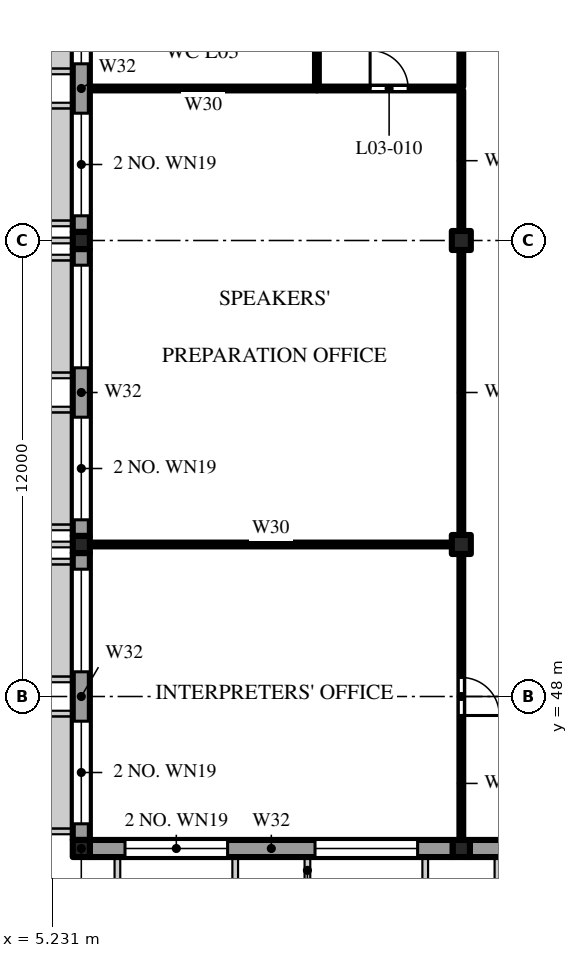
"""IFC4 building model, lengths in metres.
Left out: names, types, materials, properties, quantities, classifications, styles, units other than length and angle.
Written with IfcOpenShell. Run it as: python <this file> out.ifc"""

import sys

from ifc_helpers import new_model, si_unit, direction, frame, frame_2d, origin, origin_2d, place, context, subcontext, project, spatial, polyline, rectangle, outline, extrude, element, fill, save


model = new_model("IFC4")
c1 = context("Model", 3, precision=1e-05, world=origin(), true_north=direction((0.0, 1.0)))
c2 = subcontext(c1, "Body", "Model", "MODEL_VIEW")
j1 = project(units=[si_unit("LENGTHUNIT", "METRE"), si_unit("PLANEANGLEUNIT", "RADIAN")], contexts=[c1])
p1 = place(None, origin())
s1 = spatial("IfcSite", under=j1, at=p1, CompositionType="ELEMENT")
p2 = place(p1, origin())
s2 = spatial("IfcBuilding", under=s1, at=p2, CompositionType="ELEMENT")
p3 = place(p2, frame((0.0, 0.0, 16.8)))
s3 = spatial("IfcBuildingStorey", under=s2, at=p3, CompositionType="ELEMENT", Elevation=16.8)
p4 = place(p3, frame((6.0, 44.0, 0.0), z_axis=(0.0, 0.0, 1.0), x_axis=(1.0, 0.0, 0.0)))
e1 = element("IfcColumn", 1, at=p4, inside=s3, PredefinedType="COLUMN", context=c2, shape_type="SweptSolid", body=[
    extrude(rectangle(XDim=0.45, YDim=0.45, at=origin_2d()), origin(), (0.0, 0.0, 1.0), 3.691),
])
for number, where, z_axis, x_axis in (
    (2, (6.0, 52.0, 0.0), (0.0, 0.0, 1.0), (1.0, 0.0, 0.0)),
    (3, (6.0, 60.0, 0.0), (0.0, 0.0, 1.0), (1.0, 0.0, 0.0)),
):
    element("IfcColumn", number, at=place(p3, frame(where, z_axis=z_axis, x_axis=x_axis)), inside=s3, PredefinedType="COLUMN", context=c2, shape_type="SweptSolid", body=[
        extrude(rectangle(XDim=0.45, YDim=0.45, at=origin_2d()), origin(), (0.0, 0.0, 1.0), 4.8),
    ])
p5 = place(p3, frame((16.0, 44.0, 0.0), z_axis=(0.0, 0.0, 1.0), x_axis=(1.0, 0.0, 0.0)))
e4 = element("IfcColumn", 4, at=p5, inside=s3, PredefinedType="COLUMN", context=c2, shape_type="SweptSolid", body=[
    extrude(rectangle(XDim=0.45, YDim=0.45, at=origin_2d()), origin(), (0.0, 0.0, 1.0), 3.691),
])
for number, where, z_axis, x_axis in (
    (5, (16.0, 52.0, 0.0), (0.0, 0.0, 1.0), (1.0, 0.0, 0.0)),
    (6, (16.0, 60.0, 0.0), (0.0, 0.0, 1.0), (1.0, 0.0, 0.0)),
):
    element("IfcColumn", number, at=place(p3, frame(where, z_axis=z_axis, x_axis=x_axis)), inside=s3, PredefinedType="COLUMN", context=c2, shape_type="SweptSolid", body=[
        extrude(rectangle(XDim=0.5, YDim=0.5, at=origin_2d()), origin(), (0.0, 0.0, 1.0), 4.8),
    ])
p6 = place(p3, frame((6.225, 44.0, 0.0), z_axis=(0.0, 0.0, 1.0), x_axis=(1.0, 0.0, 0.0)))
e7 = element("IfcWall", 7, at=p6, inside=s3, PredefinedType="SOLIDWALL", context=c2, shape_type="SweptSolid", body=[
    extrude(rectangle(XDim=9.55, YDim=0.45, at=frame_2d((4.775, 0.0))), origin(), (0.0, 0.0, 1.0), 3.541),
])
p7 = place(p6, frame((0.925, 0.0, 0.8)))
e8 = element("IfcOpeningElement", 8, at=p7, cuts=e7, PredefinedType="OPENING", context=c2, shape_type="SweptSolid", body=[
    extrude(rectangle(XDim=2.7, YDim=2.4, at=frame_2d((1.35, 1.2))), frame((0.0, 0.235, 0.0), z_axis=(0.0, -1.0, 0.0), x_axis=(1.0, 0.0, 0.0)), (0.0, 0.0, 1.0), 0.47),
])
p8 = place(p6, frame((5.925, 0.0, 0.8)))
e9 = element("IfcOpeningElement", 9, at=p8, cuts=e7, PredefinedType="OPENING", context=c2, shape_type="SweptSolid", body=[
    extrude(rectangle(XDim=2.7, YDim=2.4, at=frame_2d((1.35, 1.2))), frame((0.0, 0.235, 0.0), z_axis=(0.0, -1.0, 0.0), x_axis=(1.0, 0.0, 0.0)), (0.0, 0.0, 1.0), 0.47),
])
p9 = place(p3, frame((16.225, 44.0, 0.0), z_axis=(0.0, 0.0, 1.0), x_axis=(1.0, 0.0, 0.0)))
e10 = element("IfcWall", 10, at=p9, inside=s3, PredefinedType="SOLIDWALL", context=c2, shape_type="SweptSolid", body=[
    extrude(rectangle(XDim=9.55, YDim=0.45, at=frame_2d((4.775, 0.0))), origin(), (0.0, 0.0, 1.0), 3.541),
])
p10 = place(p9, frame((0.925, 0.0, 0.8)))
e11 = element("IfcOpeningElement", 11, at=p10, cuts=e10, PredefinedType="OPENING", context=c2, shape_type="SweptSolid", body=[
    extrude(rectangle(XDim=2.7, YDim=2.4, at=frame_2d((1.35, 1.2))), frame((0.0, 0.235, 0.0), z_axis=(0.0, -1.0, 0.0), x_axis=(1.0, 0.0, 0.0)), (0.0, 0.0, 1.0), 0.47),
])
p11 = place(p9, frame((5.925, 0.0, 0.8)))
e12 = element("IfcOpeningElement", 12, at=p11, cuts=e10, PredefinedType="OPENING", context=c2, shape_type="SweptSolid", body=[
    extrude(rectangle(XDim=2.7, YDim=2.4, at=frame_2d((1.35, 1.2))), frame((0.0, 0.235, 0.0), z_axis=(0.0, -1.0, 0.0), x_axis=(1.0, 0.0, 0.0)), (0.0, 0.0, 1.0), 0.47),
])
p12 = place(p3, frame((6.225, 52.0, 0.0), z_axis=(0.0, 0.0, 1.0), x_axis=(1.0, 0.0, 0.0)))
e13 = element("IfcWall", 13, at=p12, inside=s3, PredefinedType="PARTITIONING", context=c2, shape_type="SweptSolid", body=[
    extrude(rectangle(XDim=9.525, YDim=0.1, at=frame_2d((4.762, 0.0))), origin(), (0.0, 0.0, 1.0), 5.241),
])
p13 = place(p3, frame((6.225, 64.0, 0.0), z_axis=(0.0, 0.0, 1.0), x_axis=(1.0, 0.0, 0.0)))
e14 = element("IfcWall", 14, at=p13, inside=s3, PredefinedType="PARTITIONING", context=c2, shape_type="SweptSolid", body=[
    extrude(rectangle(XDim=5.975, YDim=0.1, at=frame_2d((2.987, 0.0))), origin(), (0.0, 0.0, 1.0), 7.792),
])
p14 = place(p3, frame((12.2, 64.0, 0.0), z_axis=(0.0, 0.0, 1.0), x_axis=(1.0, 0.0, 0.0)))
e15 = element("IfcWall", 15, at=p14, inside=s3, PredefinedType="PARTITIONING", context=c2, shape_type="SweptSolid", body=[
    extrude(rectangle(XDim=3.8, YDim=0.1, at=frame_2d((1.9, 0.0))), origin(), (0.0, 0.0, 1.0), 7.792),
])
p15 = place(p14, frame((1.4, 0.0, 0.0)))
e16 = element("IfcOpeningElement", 16, at=p15, cuts=e15, PredefinedType="OPENING", context=c2, shape_type="SweptSolid", body=[
    extrude(rectangle(XDim=1.0, YDim=2.1, at=frame_2d((0.5, 1.05))), frame((0.0, 0.06, 0.0), z_axis=(0.0, -1.0, 0.0), x_axis=(1.0, 0.0, 0.0)), (0.0, 0.0, 1.0), 0.12),
])
p16 = place(p3, frame((6.0, 51.775, 0.0), z_axis=(0.0, 0.0, 1.0), x_axis=(0.0, -1.0, 0.0)))
e17 = element("IfcWall", 17, at=p16, inside=s3, PredefinedType="SOLIDWALL", context=c2, shape_type="SweptSolid", body=[
    extrude(outline(polyline([(0.0, 0.0), (7.55, 0.0), (7.55, 3.589), (0.0, 5.194), (0.0, 0.0)])), frame((0.0, 0.225, 0.0), z_axis=(0.0, -1.0, 0.0), x_axis=(1.0, 0.0, 0.0)), (0.0, 0.0, 1.0), 0.45),
])
p17 = place(p16, frame((4.425, 0.0, 0.8)))
e18 = element("IfcOpeningElement", 18, at=p17, cuts=e17, PredefinedType="OPENING", context=c2, shape_type="SweptSolid", body=[
    extrude(rectangle(XDim=2.7, YDim=2.4, at=frame_2d((1.35, 1.2))), frame((0.0, 0.235, 0.0), z_axis=(0.0, -1.0, 0.0), x_axis=(1.0, 0.0, 0.0)), (0.0, 0.0, 1.0), 0.47),
])
p18 = place(p16, frame((0.425, 0.0, 0.8)))
e19 = element("IfcOpeningElement", 19, at=p18, cuts=e17, PredefinedType="OPENING", context=c2, shape_type="SweptSolid", body=[
    extrude(rectangle(XDim=2.7, YDim=2.4, at=frame_2d((1.35, 1.2))), frame((0.0, 0.235, 0.0), z_axis=(0.0, -1.0, 0.0), x_axis=(1.0, 0.0, 0.0)), (0.0, 0.0, 1.0), 0.47),
])
p19 = place(p3, frame((6.0, 59.775, 0.0), z_axis=(0.0, 0.0, 1.0), x_axis=(0.0, -1.0, 0.0)))
e20 = element("IfcWall", 20, at=p19, inside=s3, PredefinedType="SOLIDWALL", context=c2, shape_type="SweptSolid", body=[
    extrude(outline(polyline([(0.0, 0.0), (7.55, 0.0), (7.55, 5.289), (0.0, 6.894), (0.0, 0.0)])), frame((0.0, 0.225, 0.0), z_axis=(0.0, -1.0, 0.0), x_axis=(1.0, 0.0, 0.0)), (0.0, 0.0, 1.0), 0.45),
])
p20 = place(p19, frame((4.425, 0.0, 0.8)))
e21 = element("IfcOpeningElement", 21, at=p20, cuts=e20, PredefinedType="OPENING", context=c2, shape_type="SweptSolid", body=[
    extrude(rectangle(XDim=2.7, YDim=2.4, at=frame_2d((1.35, 1.2))), frame((0.0, 0.235, 0.0), z_axis=(0.0, -1.0, 0.0), x_axis=(1.0, 0.0, 0.0)), (0.0, 0.0, 1.0), 0.47),
])
p21 = place(p19, frame((0.425, 0.0, 0.8)))
e22 = element("IfcOpeningElement", 22, at=p21, cuts=e20, PredefinedType="OPENING", context=c2, shape_type="SweptSolid", body=[
    extrude(rectangle(XDim=2.7, YDim=2.4, at=frame_2d((1.35, 1.2))), frame((0.0, 0.235, 0.0), z_axis=(0.0, -1.0, 0.0), x_axis=(1.0, 0.0, 0.0)), (0.0, 0.0, 1.0), 0.47),
])
p22 = place(p3, frame((6.0, 67.775, 0.0), z_axis=(0.0, 0.0, 1.0), x_axis=(0.0, -1.0, 0.0)))
e23 = element("IfcWall", 23, at=p22, inside=s3, PredefinedType="SOLIDWALL", context=c2, shape_type="SweptSolid", body=[
    extrude(outline(polyline([(0.0, 0.0), (7.55, 0.0), (7.55, 6.99), (0.0, 8.595), (0.0, 0.0)])), frame((0.0, 0.225, 0.0), z_axis=(0.0, -1.0, 0.0), x_axis=(1.0, 0.0, 0.0)), (0.0, 0.0, 1.0), 0.45),
])
p23 = place(p22, frame((4.425, 0.0, 0.8)))
e24 = element("IfcOpeningElement", 24, at=p23, cuts=e23, PredefinedType="OPENING", context=c2, shape_type="SweptSolid", body=[
    extrude(rectangle(XDim=2.7, YDim=2.4, at=frame_2d((1.35, 1.2))), frame((0.0, 0.235, 0.0), z_axis=(0.0, -1.0, 0.0), x_axis=(1.0, 0.0, 0.0)), (0.0, 0.0, 1.0), 0.47),
])
p24 = place(p22, frame((0.425, 0.0, 0.8)))
e25 = element("IfcOpeningElement", 25, at=p24, cuts=e23, PredefinedType="OPENING", context=c2, shape_type="SweptSolid", body=[
    extrude(rectangle(XDim=2.7, YDim=2.4, at=frame_2d((1.35, 1.2))), frame((0.0, 0.235, 0.0), z_axis=(0.0, -1.0, 0.0), x_axis=(1.0, 0.0, 0.0)), (0.0, 0.0, 1.0), 0.47),
])
p25 = place(p3, frame((12.2, 64.05, 0.0), z_axis=(0.0, 0.0, 1.0), x_axis=(0.0, 1.0, 0.0)))
e26 = element("IfcWall", 26, at=p25, inside=s3, PredefinedType="PARTITIONING", context=c2, shape_type="SweptSolid", body=[
    extrude(outline(polyline([(0.0, 0.0), (11.85, 0.0), (11.85, 10.322), (0.0, 7.803), (0.0, 0.0)])), frame((0.0, 0.05, 0.0), z_axis=(0.0, -1.0, 0.0), x_axis=(1.0, 0.0, 0.0)), (0.0, 0.0, 1.0), 0.1),
])
p26 = place(p25, frame((1.4, 0.0, 0.0)))
e27 = element("IfcOpeningElement", 27, at=p26, cuts=e26, PredefinedType="OPENING", context=c2, shape_type="SweptSolid", body=[
    extrude(rectangle(XDim=1.1, YDim=2.1, at=frame_2d((0.55, 1.05))), frame((0.0, 0.06, 0.0), z_axis=(0.0, -1.0, 0.0), x_axis=(1.0, 0.0, 0.0)), (0.0, 0.0, 1.0), 0.12),
])
p27 = place(p25, frame((5.45, 0.0, 0.0)))
e28 = element("IfcOpeningElement", 28, at=p27, cuts=e26, PredefinedType="OPENING", context=c2, shape_type="SweptSolid", body=[
    extrude(rectangle(XDim=1.0, YDim=2.1, at=frame_2d((0.5, 1.05))), frame((0.0, 0.06, 0.0), z_axis=(0.0, -1.0, 0.0), x_axis=(1.0, 0.0, 0.0)), (0.0, 0.0, 1.0), 0.12),
])
p28 = place(p25, frame((9.45, 0.0, 0.0)))
e29 = element("IfcOpeningElement", 29, at=p28, cuts=e26, PredefinedType="OPENING", context=c2, shape_type="SweptSolid", body=[
    extrude(rectangle(XDim=1.0, YDim=2.1, at=frame_2d((0.5, 1.05))), frame((0.0, 0.06, 0.0), z_axis=(0.0, -1.0, 0.0), x_axis=(1.0, 0.0, 0.0)), (0.0, 0.0, 1.0), 0.12),
])
p29 = place(p3, frame((16.0, 44.225, 0.0), z_axis=(0.0, 0.0, 1.0), x_axis=(0.0, 1.0, 0.0)))
e30 = element("IfcWall", 30, at=p29, inside=s3, PredefinedType="PARTITIONING", context=c2, shape_type="SweptSolid", body=[
    extrude(outline(polyline([(0.0, 0.0), (7.525, 0.0), (7.525, 5.188), (0.0, 3.589), (0.0, 0.0)])), frame((0.0, 0.05, 0.0), z_axis=(0.0, -1.0, 0.0), x_axis=(1.0, 0.0, 0.0)), (0.0, 0.0, 1.0), 0.1),
])
p30 = place(p29, frame((3.275, 0.0, 0.0)))
e31 = element("IfcOpeningElement", 31, at=p30, cuts=e30, PredefinedType="OPENING", context=c2, shape_type="SweptSolid", body=[
    extrude(rectangle(XDim=1.0, YDim=2.1, at=frame_2d((0.5, 1.05))), frame((0.0, 0.06, 0.0), z_axis=(0.0, -1.0, 0.0), x_axis=(1.0, 0.0, 0.0)), (0.0, 0.0, 1.0), 0.12),
])
p31 = place(p3, frame((16.0, 52.25, 0.0), z_axis=(0.0, 0.0, 1.0), x_axis=(0.0, 1.0, 0.0)))
e32 = element("IfcWall", 32, at=p31, inside=s3, PredefinedType="PARTITIONING", context=c2, shape_type="SweptSolid", body=[
    extrude(outline(polyline([(0.0, 0.0), (7.5, 0.0), (7.5, 6.889), (0.0, 5.295), (0.0, 0.0)])), frame((0.0, 0.05, 0.0), z_axis=(0.0, -1.0, 0.0), x_axis=(1.0, 0.0, 0.0)), (0.0, 0.0, 1.0), 0.1),
])
p32 = place(p3, frame((16.0, 60.25, 0.0), z_axis=(0.0, 0.0, 1.0), x_axis=(0.0, 1.0, 0.0)))
e33 = element("IfcWall", 33, at=p32, inside=s3, PredefinedType="PARTITIONING", context=c2, shape_type="SweptSolid", body=[
    extrude(outline(polyline([(0.0, 0.0), (3.7, 0.0), (3.7, 7.781), (0.0, 6.995), (0.0, 0.0)])), frame((0.0, 0.05, 0.0), z_axis=(0.0, -1.0, 0.0), x_axis=(1.0, 0.0, 0.0)), (0.0, 0.0, 1.0), 0.1),
])
p33 = place(p3, frame((16.0, 64.05, 0.0), z_axis=(0.0, 0.0, 1.0), x_axis=(0.0, 1.0, 0.0)))
e34 = element("IfcWall", 34, at=p33, inside=s3, PredefinedType="PARTITIONING", context=c2, shape_type="SweptSolid", body=[
    extrude(outline(polyline([(0.0, 0.0), (3.7, 0.0), (3.7, 8.589), (0.0, 7.803), (0.0, 0.0)])), frame((0.0, 0.05, 0.0), z_axis=(0.0, -1.0, 0.0), x_axis=(1.0, 0.0, 0.0)), (0.0, 0.0, 1.0), 0.1),
])
p34 = place(p15, origin())
e35 = element("IfcDoor", 35, at=p34, inside=s3, OperationType="SINGLE_SWING_RIGHT", PredefinedType="DOOR", context=c2, shape_type="SweptSolid", body=[
    extrude(rectangle(XDim=1.0, YDim=2.1, at=frame_2d((0.5, 1.05))), frame((0.0, 0.025, 0.0), z_axis=(0.0, -1.0, 0.0), x_axis=(1.0, 0.0, 0.0)), (0.0, 0.0, 1.0), 0.05),
])
fill(e16, e35)
p35 = place(p30, frame((1.0, 0.0, 0.0), z_axis=(0.0, 0.0, 1.0), x_axis=(-1.0, 0.0, 0.0)))
e36 = element("IfcDoor", 36, at=p35, inside=s3, OperationType="SINGLE_SWING_RIGHT", PredefinedType="DOOR", context=c2, shape_type="SweptSolid", body=[
    extrude(rectangle(XDim=1.0, YDim=2.1, at=frame_2d((0.5, 1.05))), frame((0.0, 0.025, 0.0), z_axis=(0.0, -1.0, 0.0), x_axis=(1.0, 0.0, 0.0)), (0.0, 0.0, 1.0), 0.05),
])
fill(e31, e36)
p36 = place(p7, origin())
e37 = element("IfcWindow", 37, at=p36, inside=s3, PartitioningType="SINGLE_PANEL", PredefinedType="WINDOW", context=c2, shape_type="SweptSolid", body=[
    extrude(rectangle(XDim=2.7, YDim=2.4, at=frame_2d((1.35, 1.2))), frame((0.0, 0.215, 0.0), z_axis=(0.0, -1.0, 0.0), x_axis=(1.0, 0.0, 0.0)), (0.0, 0.0, 1.0), 0.06),
])
fill(e8, e37)
p37 = place(p8, origin())
e38 = element("IfcWindow", 38, at=p37, inside=s3, PartitioningType="SINGLE_PANEL", PredefinedType="WINDOW", context=c2, shape_type="SweptSolid", body=[
    extrude(rectangle(XDim=2.7, YDim=2.4, at=frame_2d((1.35, 1.2))), frame((0.0, 0.215, 0.0), z_axis=(0.0, -1.0, 0.0), x_axis=(1.0, 0.0, 0.0)), (0.0, 0.0, 1.0), 0.06),
])
fill(e9, e38)
p38 = place(p17, origin())
e39 = element("IfcWindow", 39, at=p38, inside=s3, PartitioningType="SINGLE_PANEL", PredefinedType="WINDOW", context=c2, shape_type="SweptSolid", body=[
    extrude(rectangle(XDim=2.7, YDim=2.4, at=frame_2d((1.35, 1.2))), frame((0.0, 0.215, 0.0), z_axis=(0.0, -1.0, 0.0), x_axis=(1.0, 0.0, 0.0)), (0.0, 0.0, 1.0), 0.06),
])
fill(e18, e39)
p39 = place(p18, origin())
e40 = element("IfcWindow", 40, at=p39, inside=s3, PartitioningType="SINGLE_PANEL", PredefinedType="WINDOW", context=c2, shape_type="SweptSolid", body=[
    extrude(rectangle(XDim=2.7, YDim=2.4, at=frame_2d((1.35, 1.2))), frame((0.0, 0.215, 0.0), z_axis=(0.0, -1.0, 0.0), x_axis=(1.0, 0.0, 0.0)), (0.0, 0.0, 1.0), 0.06),
])
fill(e19, e40)
p40 = place(p20, origin())
e41 = element("IfcWindow", 41, at=p40, inside=s3, PartitioningType="SINGLE_PANEL", PredefinedType="WINDOW", context=c2, shape_type="SweptSolid", body=[
    extrude(rectangle(XDim=2.7, YDim=2.4, at=frame_2d((1.35, 1.2))), frame((0.0, 0.215, 0.0), z_axis=(0.0, -1.0, 0.0), x_axis=(1.0, 0.0, 0.0)), (0.0, 0.0, 1.0), 0.06),
])
fill(e21, e41)
p41 = place(p21, origin())
e42 = element("IfcWindow", 42, at=p41, inside=s3, PartitioningType="SINGLE_PANEL", PredefinedType="WINDOW", context=c2, shape_type="SweptSolid", body=[
    extrude(rectangle(XDim=2.7, YDim=2.4, at=frame_2d((1.35, 1.2))), frame((0.0, 0.215, 0.0), z_axis=(0.0, -1.0, 0.0), x_axis=(1.0, 0.0, 0.0)), (0.0, 0.0, 1.0), 0.06),
])
fill(e22, e42)
p42 = place(p23, origin())
e43 = element("IfcWindow", 43, at=p42, inside=s3, PartitioningType="SINGLE_PANEL", PredefinedType="WINDOW", context=c2, shape_type="SweptSolid", body=[
    extrude(rectangle(XDim=2.7, YDim=2.4, at=frame_2d((1.35, 1.2))), frame((0.0, 0.215, 0.0), z_axis=(0.0, -1.0, 0.0), x_axis=(1.0, 0.0, 0.0)), (0.0, 0.0, 1.0), 0.06),
])
fill(e24, e43)
p43 = place(p24, origin())
e44 = element("IfcWindow", 44, at=p43, inside=s3, PartitioningType="SINGLE_PANEL", PredefinedType="WINDOW", context=c2, shape_type="SweptSolid", body=[
    extrude(rectangle(XDim=2.7, YDim=2.4, at=frame_2d((1.35, 1.2))), frame((0.0, 0.215, 0.0), z_axis=(0.0, -1.0, 0.0), x_axis=(1.0, 0.0, 0.0)), (0.0, 0.0, 1.0), 0.06),
])
fill(e25, e44)
save(model, sys.argv[1])
